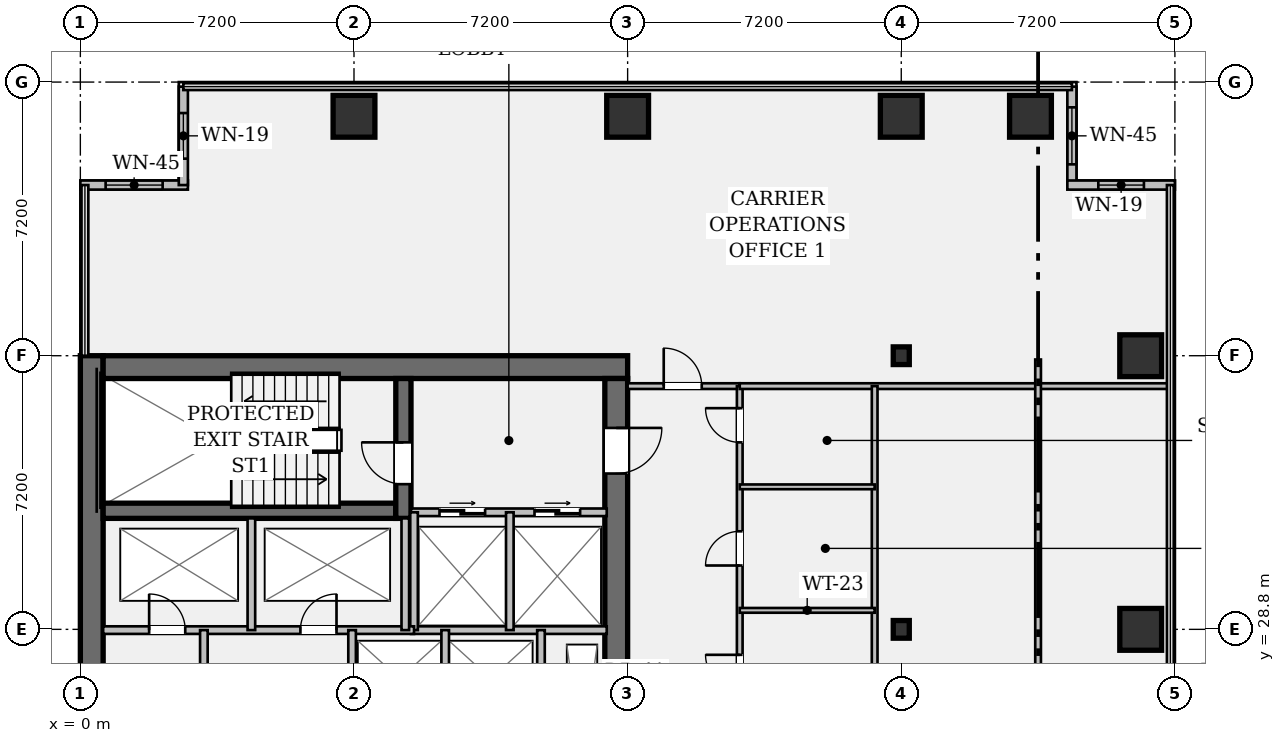
"""IFC4 building model, lengths in metres.
Left out: names, types, materials, properties, quantities, classifications, styles, units other than length and angle.
Written with IfcOpenShell. Run it as: python <this file> out.ifc"""

import sys

from ifc_helpers import new_model, si_unit, direction, frame, frame_2d, origin, origin_2d, place, context, subcontext, project, spatial, rectangle, hollow_rectangle, i_section, extrude, element, fill, save


model = new_model("IFC4")
c1 = context("Model", 3, precision=1e-05, world=origin(), true_north=direction((0.0, 1.0)))
c2 = subcontext(c1, "Body", "Model", "MODEL_VIEW")
j1 = project(units=[si_unit("LENGTHUNIT", "METRE"), si_unit("PLANEANGLEUNIT", "RADIAN")], contexts=[c1])
p1 = place(None, origin())
s1 = spatial("IfcSite", under=j1, at=p1, CompositionType="ELEMENT")
p2 = place(p1, origin())
s2 = spatial("IfcBuilding", under=s1, at=p2, CompositionType="ELEMENT")
p3 = place(p2, frame((0.0, 0.0, 35.0)))
s3 = spatial("IfcBuildingStorey", under=s2, at=p3, CompositionType="ELEMENT", Elevation=35.0)
p4 = place(p3, frame((0.3, 7.2, 0.0), z_axis=(0.0, 0.0, 1.0), x_axis=(0.0, 1.0, 0.0)))
e1 = element("IfcWall", 1, at=p4, inside=s3, PredefinedType="SHEAR", context=c2, shape_type="SweptSolid", body=[
    extrude(rectangle(XDim=28.8, YDim=0.6, at=frame_2d((14.4, 0.0))), origin(), (0.0, 0.0, 1.0), 3.57),
])
p5 = place(p3, frame((0.6, 35.7, 0.0), z_axis=(0.0, 0.0, 1.0), x_axis=(1.0, 0.0, 0.0)))
e2 = element("IfcWall", 2, at=p5, inside=s3, PredefinedType="SHEAR", context=c2, shape_type="SweptSolid", body=[
    extrude(rectangle(XDim=13.8, YDim=0.6, at=frame_2d((6.9, 0.0))), origin(), (0.0, 0.0, 1.0), 3.57),
])
p6 = place(p3, frame((14.1, 35.4, 0.0), z_axis=(0.0, 0.0, 1.0), x_axis=(0.0, -1.0, 0.0)))
e3 = element("IfcWall", 3, at=p6, inside=s3, PredefinedType="SHEAR", context=c2, shape_type="SweptSolid", body=[
    extrude(rectangle(XDim=27.6, YDim=0.6, at=frame_2d((13.8, 0.0))), origin(), (0.0, 0.0, 1.0), 3.57),
])
p7 = place(p6, frame((1.3, 0.0, 0.0)))
e4 = element("IfcOpeningElement", 4, at=p7, cuts=e3, PredefinedType="OPENING", context=c2, shape_type="SweptSolid", body=[
    extrude(rectangle(XDim=1.2, YDim=2.15, at=frame_2d((0.6, 1.075))), frame((0.0, 0.312, 0.0), z_axis=(0.0, -1.0, 0.0), x_axis=(1.0, 0.0, 0.0)), (0.0, 0.0, 1.0), 0.624),
])
p8 = place(p6, frame((25.25, 0.0, 0.0)))
e5 = element("IfcOpeningElement", 5, at=p8, cuts=e3, PredefinedType="OPENING", context=c2, shape_type="SweptSolid", body=[
    extrude(rectangle(XDim=1.2, YDim=2.15, at=frame_2d((0.6, 1.075))), frame((0.0, 0.312, 0.0), z_axis=(0.0, -1.0, 0.0), x_axis=(1.0, 0.0, 0.0)), (0.0, 0.0, 1.0), 0.624),
])
p9 = place(p6, frame((14.6, 0.0, 0.0)))
e6 = element("IfcOpeningElement", 6, at=p9, cuts=e3, PredefinedType="OPENING", context=c2, shape_type="SweptSolid", body=[
    extrude(rectangle(XDim=1.6, YDim=2.2, at=frame_2d((0.8, 1.1))), frame((0.0, 0.312, 0.0), z_axis=(0.0, -1.0, 0.0), x_axis=(1.0, 0.0, 0.0)), (0.0, 0.0, 1.0), 0.624),
])
p10 = place(p3, frame((0.6, 31.92, 0.0), z_axis=(0.0, 0.0, 1.0), x_axis=(1.0, 0.0, 0.0)))
e7 = element("IfcWall", 7, at=p10, inside=s3, PredefinedType="SHEAR", context=c2, shape_type="SweptSolid", body=[
    extrude(rectangle(XDim=7.7, YDim=0.4, at=frame_2d((3.85, 0.0))), origin(), (0.0, 0.0, 1.0), 3.57),
])
p11 = place(p3, frame((8.5, 31.72, 0.0), z_axis=(0.0, 0.0, 1.0), x_axis=(0.0, 1.0, 0.0)))
e8 = element("IfcWall", 8, at=p11, inside=s3, PredefinedType="SHEAR", context=c2, shape_type="SweptSolid", body=[
    extrude(rectangle(XDim=3.68, YDim=0.4, at=frame_2d((1.84, 0.0))), origin(), (0.0, 0.0, 1.0), 3.57),
])
p12 = place(p11, frame((0.9, 0.0, 0.0)))
e9 = element("IfcOpeningElement", 9, at=p12, cuts=e8, PredefinedType="OPENING", context=c2, shape_type="SweptSolid", body=[
    extrude(rectangle(XDim=1.1, YDim=2.15, at=frame_2d((0.55, 1.075))), frame((0.0, 0.212, 0.0), z_axis=(0.0, -1.0, 0.0), x_axis=(1.0, 0.0, 0.0)), (0.0, 0.0, 1.0), 0.424),
])
for number, where, z_axis, x_axis in (
    (10, (7.2, 42.3, 0.0), (0.0, 0.0, 1.0), (1.0, 0.0, 0.0)),
    (11, (14.4, 42.3, 0.0), (0.0, 0.0, 1.0), (1.0, 0.0, 0.0)),
):
    element("IfcColumn", number, at=place(p3, frame(where, z_axis=z_axis, x_axis=x_axis)), inside=s3, PredefinedType="COLUMN", context=c2, shape_type="SweptSolid", body=[
        extrude(hollow_rectangle(XDim=1.1, YDim=1.1, WallThickness=0.07, at=origin_2d()), origin(), (0.0, 0.0, 1.0), 3.57),
    ])
for number, where, z_axis, x_axis in (
    (12, (21.6, 28.8, 0.0), (0.0, 0.0, 1.0), (1.0, 0.0, 0.0)),
    (13, (21.6, 36.0, 0.0), (0.0, 0.0, 1.0), (1.0, 0.0, 0.0)),
):
    element("IfcColumn", number, at=place(p3, frame(where, z_axis=z_axis, x_axis=x_axis)), inside=s3, PredefinedType="COLUMN", context=c2, shape_type="SweptSolid", body=[
        extrude(i_section(OverallWidth=0.422, OverallDepth=0.465, WebThickness=0.045, FlangeThickness=0.073, FilletRadius=0.018, at=origin_2d()), origin(), (0.0, 0.0, 1.0), 3.57),
    ])
for number, where, z_axis, x_axis in (
    (14, (21.6, 42.3, 0.0), (0.0, 0.0, 1.0), (1.0, 0.0, 0.0)),
    (15, (25.0, 42.3, 0.0), (0.0, 0.0, 1.0), (1.0, 0.0, 0.0)),
    (16, (27.9, 28.8, 0.0), (0.0, 0.0, 1.0), (1.0, 0.0, 0.0)),
    (17, (27.9, 36.0, 0.0), (0.0, 0.0, 1.0), (1.0, 0.0, 0.0)),
):
    element("IfcColumn", number, at=place(p3, frame(where, z_axis=z_axis, x_axis=x_axis)), inside=s3, PredefinedType="COLUMN", context=c2, shape_type="SweptSolid", body=[
        extrude(hollow_rectangle(XDim=1.1, YDim=1.1, WallThickness=0.07, at=origin_2d()), origin(), (0.0, 0.0, 1.0), 3.57),
    ])
p13 = place(p3, frame((0.0, 40.49, 0.0), z_axis=(0.0, 0.0, 1.0), x_axis=(1.0, 0.0, 0.0)))
e18 = element("IfcWall", 18, at=p13, inside=s3, PredefinedType="STANDARD", context=c2, shape_type="SweptSolid", body=[
    extrude(rectangle(XDim=2.83, YDim=0.24, at=frame_2d((1.415, 0.0))), origin(), (0.0, 0.0, 1.0), 3.57),
])
p14 = place(p13, frame((0.665, 0.0, 0.95)))
e19 = element("IfcOpeningElement", 19, at=p14, cuts=e18, PredefinedType="OPENING", context=c2, shape_type="SweptSolid", body=[
    extrude(rectangle(XDim=1.5, YDim=1.8, at=frame_2d((0.75, 0.9))), frame((0.0, 0.132, 0.0), z_axis=(0.0, -1.0, 0.0), x_axis=(1.0, 0.0, 0.0)), (0.0, 0.0, 1.0), 0.264),
])
p15 = place(p3, frame((2.71, 40.49, 0.0), z_axis=(0.0, 0.0, 1.0), x_axis=(0.0, 1.0, 0.0)))
e20 = element("IfcWall", 20, at=p15, inside=s3, PredefinedType="STANDARD", context=c2, shape_type="SweptSolid", body=[
    extrude(rectangle(XDim=2.59, YDim=0.24, at=frame_2d((1.295, 0.0))), origin(), (0.0, 0.0, 1.0), 3.57),
])
p16 = place(p15, frame((0.695, 0.0, 0.95)))
e21 = element("IfcOpeningElement", 21, at=p16, cuts=e20, PredefinedType="OPENING", context=c2, shape_type="SweptSolid", body=[
    extrude(rectangle(XDim=1.2, YDim=1.8, at=frame_2d((0.6, 0.9))), frame((0.0, 0.132, 0.0), z_axis=(0.0, -1.0, 0.0), x_axis=(1.0, 0.0, 0.0)), (0.0, 0.0, 1.0), 0.264),
])
p17 = place(p3, frame((26.09, 43.08, 0.0), z_axis=(0.0, 0.0, 1.0), x_axis=(0.0, -1.0, 0.0)))
e22 = element("IfcWall", 22, at=p17, inside=s3, PredefinedType="STANDARD", context=c2, shape_type="SweptSolid", body=[
    extrude(rectangle(XDim=2.59, YDim=0.24, at=frame_2d((1.295, 0.0))), origin(), (0.0, 0.0, 1.0), 3.57),
])
p18 = place(p17, frame((0.545, 0.0, 0.95)))
e23 = element("IfcOpeningElement", 23, at=p18, cuts=e22, PredefinedType="OPENING", context=c2, shape_type="SweptSolid", body=[
    extrude(rectangle(XDim=1.5, YDim=1.8, at=frame_2d((0.75, 0.9))), frame((0.0, 0.132, 0.0), z_axis=(0.0, -1.0, 0.0), x_axis=(1.0, 0.0, 0.0)), (0.0, 0.0, 1.0), 0.264),
])
p19 = place(p3, frame((25.97, 40.49, 0.0), z_axis=(0.0, 0.0, 1.0), x_axis=(1.0, 0.0, 0.0)))
e24 = element("IfcWall", 24, at=p19, inside=s3, PredefinedType="STANDARD", context=c2, shape_type="SweptSolid", body=[
    extrude(rectangle(XDim=2.83, YDim=0.24, at=frame_2d((1.415, 0.0))), origin(), (0.0, 0.0, 1.0), 3.57),
])
p20 = place(p19, frame((0.815, 0.0, 0.95)))
e25 = element("IfcOpeningElement", 25, at=p20, cuts=e24, PredefinedType="OPENING", context=c2, shape_type="SweptSolid", body=[
    extrude(rectangle(XDim=1.2, YDim=1.8, at=frame_2d((0.6, 0.9))), frame((0.0, 0.132, 0.0), z_axis=(0.0, -1.0, 0.0), x_axis=(1.0, 0.0, 0.0)), (0.0, 0.0, 1.0), 0.264),
])
p21 = place(p3, frame((8.7, 31.88, 0.0), z_axis=(0.0, 0.0, 1.0), x_axis=(1.0, 0.0, 0.0)))
e26 = element("IfcWall", 26, at=p21, inside=s3, PredefinedType="PARTITIONING", context=c2, shape_type="SweptSolid", body=[
    extrude(rectangle(XDim=5.15, YDim=0.2, at=frame_2d((2.575, 0.0))), origin(), (0.0, 0.0, 1.0), 3.57),
])
p22 = place(p21, frame((0.75, 0.0, 0.0)))
e27 = element("IfcOpeningElement", 27, at=p22, cuts=e26, PredefinedType="OPENING", context=c2, shape_type="SweptSolid", body=[
    extrude(rectangle(XDim=1.2, YDim=2.2, at=frame_2d((0.6, 1.1))), frame((0.0, 0.112, 0.0), z_axis=(0.0, -1.0, 0.0), x_axis=(1.0, 0.0, 0.0)), (0.0, 0.0, 1.0), 0.224),
])
p23 = place(p21, frame((3.25, 0.0, 0.0)))
e28 = element("IfcOpeningElement", 28, at=p23, cuts=e26, PredefinedType="OPENING", context=c2, shape_type="SweptSolid", body=[
    extrude(rectangle(XDim=1.2, YDim=2.2, at=frame_2d((0.6, 1.1))), frame((0.0, 0.112, 0.0), z_axis=(0.0, -1.0, 0.0), x_axis=(1.0, 0.0, 0.0)), (0.0, 0.0, 1.0), 0.224),
])
p24 = place(p3, frame((8.7, 28.78, 0.0), z_axis=(0.0, 0.0, 1.0), x_axis=(1.0, 0.0, 0.0)))
e29 = element("IfcWall", 29, at=p24, inside=s3, PredefinedType="PARTITIONING", context=c2, shape_type="SweptSolid", body=[
    extrude(rectangle(XDim=5.15, YDim=0.2, at=frame_2d((2.575, 0.0))), origin(), (0.0, 0.0, 1.0), 3.57),
])
for number, where, z_axis, x_axis in (
    (30, (8.78, 28.78, 0.0), (0.0, 0.0, 1.0), (0.0, 1.0, 0.0)),
    (31, (11.3, 28.78, 0.0), (0.0, 0.0, 1.0), (0.0, 1.0, 0.0)),
):
    element("IfcWall", number, at=place(p3, frame(where, z_axis=z_axis, x_axis=x_axis)), inside=s3, PredefinedType="PARTITIONING", context=c2, shape_type="SweptSolid", body=[
        extrude(rectangle(XDim=3.1, YDim=0.2, at=frame_2d((1.55, 0.0))), origin(), (0.0, 0.0, 1.0), 3.57),
    ])
p25 = place(p3, frame((0.6, 28.78, 0.0), z_axis=(0.0, 0.0, 1.0), x_axis=(1.0, 0.0, 0.0)))
e32 = element("IfcWall", 32, at=p25, inside=s3, PredefinedType="PARTITIONING", context=c2, shape_type="SweptSolid", body=[
    extrude(rectangle(XDim=8.18, YDim=0.2, at=frame_2d((4.09, 0.0))), origin(), (0.0, 0.0, 1.0), 3.57),
])
p26 = place(p25, frame((1.21, 0.0, 0.0)))
e33 = element("IfcOpeningElement", 33, at=p26, cuts=e32, PredefinedType="OPENING", context=c2, shape_type="SweptSolid", body=[
    extrude(rectangle(XDim=0.95, YDim=2.15, at=frame_2d((0.475, 1.075))), frame((0.0, 0.112, 0.0), z_axis=(0.0, -1.0, 0.0), x_axis=(1.0, 0.0, 0.0)), (0.0, 0.0, 1.0), 0.224),
])
p27 = place(p25, frame((5.19, 0.0, 0.0)))
e34 = element("IfcOpeningElement", 34, at=p27, cuts=e32, PredefinedType="OPENING", context=c2, shape_type="SweptSolid", body=[
    extrude(rectangle(XDim=0.95, YDim=2.15, at=frame_2d((0.475, 1.075))), frame((0.0, 0.112, 0.0), z_axis=(0.0, -1.0, 0.0), x_axis=(1.0, 0.0, 0.0)), (0.0, 0.0, 1.0), 0.224),
])
for number, where, z_axis, x_axis in (
    (35, (4.5, 28.78, 0.0), (0.0, 0.0, 1.0), (0.0, 1.0, 0.0)),
    (36, (8.55, 28.78, 0.0), (0.0, 0.0, 1.0), (0.0, 1.0, 0.0)),
):
    element("IfcWall", number, at=place(p3, frame(where, z_axis=z_axis, x_axis=x_axis)), inside=s3, PredefinedType="PARTITIONING", context=c2, shape_type="SweptSolid", body=[
        extrude(rectangle(XDim=2.94, YDim=0.2, at=frame_2d((1.47, 0.0))), origin(), (0.0, 0.0, 1.0), 3.57),
    ])
p28 = place(p3, frame((3.25, 15.7, 0.0), z_axis=(0.0, 0.0, 1.0), x_axis=(0.0, 1.0, 0.0)))
e37 = element("IfcWall", 37, at=p28, inside=s3, PredefinedType="PARTITIONING", context=c2, shape_type="SweptSolid", body=[
    extrude(rectangle(XDim=13.08, YDim=0.2, at=frame_2d((6.54, 0.0))), origin(), (0.0, 0.0, 1.0), 3.57),
])
for number, where, z_axis, x_axis in (
    (38, (7.15, 26.4, 0.0), (0.0, 0.0, 1.0), (0.0, 1.0, 0.0)),
    (39, (9.6, 26.4, 0.0), (0.0, 0.0, 1.0), (0.0, 1.0, 0.0)),
):
    element("IfcWall", number, at=place(p3, frame(where, z_axis=z_axis, x_axis=x_axis)), inside=s3, PredefinedType="PARTITIONING", context=c2, shape_type="SweptSolid", body=[
        extrude(rectangle(XDim=2.38, YDim=0.2, at=frame_2d((1.19, 0.0))), origin(), (0.0, 0.0, 1.0), 3.57),
    ])
p29 = place(p3, frame((12.12, 22.2, 0.0), z_axis=(0.0, 0.0, 1.0), x_axis=(0.0, 1.0, 0.0)))
e40 = element("IfcWall", 40, at=p29, inside=s3, PredefinedType="PARTITIONING", context=c2, shape_type="SweptSolid", body=[
    extrude(rectangle(XDim=6.58, YDim=0.2, at=frame_2d((3.29, 0.0))), origin(), (0.0, 0.0, 1.0), 3.57),
])
p30 = place(p29, frame((2.75, 0.0, 0.0)))
e41 = element("IfcOpeningElement", 41, at=p30, cuts=e40, PredefinedType="OPENING", context=c2, shape_type="SweptSolid", body=[
    extrude(rectangle(XDim=0.85, YDim=2.15, at=frame_2d((0.425, 1.075))), frame((0.0, 0.112, 0.0), z_axis=(0.0, -1.0, 0.0), x_axis=(1.0, 0.0, 0.0)), (0.0, 0.0, 1.0), 0.224),
])
p31 = place(p3, frame((14.4, 35.2, 0.0), z_axis=(0.0, 0.0, 1.0), x_axis=(1.0, 0.0, 0.0)))
e42 = element("IfcWall", 42, at=p31, inside=s3, PredefinedType="PARTITIONING", context=c2, shape_type="SweptSolid", body=[
    extrude(rectangle(XDim=2.95, YDim=0.15, at=frame_2d((1.475, 0.0))), origin(), (0.0, 0.0, 1.0), 2.628),
])
p32 = place(p31, frame((0.95, 0.0, 0.0)))
e43 = element("IfcOpeningElement", 43, at=p32, cuts=e42, PredefinedType="OPENING", context=c2, shape_type="SweptSolid", body=[
    extrude(rectangle(XDim=1.0, YDim=2.15, at=frame_2d((0.5, 1.075))), frame((0.0, 0.087, 0.0), z_axis=(0.0, -1.0, 0.0), x_axis=(1.0, 0.0, 0.0)), (0.0, 0.0, 1.0), 0.174),
])
p33 = place(p3, frame((17.35, 13.0, 0.0), z_axis=(0.0, 0.0, 1.0), x_axis=(0.0, 1.0, 0.0)))
e44 = element("IfcWall", 44, at=p33, inside=s3, PredefinedType="PARTITIONING", context=c2, shape_type="SweptSolid", body=[
    extrude(rectangle(XDim=22.2, YDim=0.15, at=frame_2d((11.1, 0.0))), origin(), (0.0, 0.0, 1.0), 2.628),
])
p34 = place(p33, frame((10.98, 0.0, 0.0)))
e45 = element("IfcOpeningElement", 45, at=p34, cuts=e44, PredefinedType="OPENING", context=c2, shape_type="SweptSolid", body=[
    extrude(rectangle(XDim=0.9, YDim=2.15, at=frame_2d((0.45, 1.075))), frame((0.0, 0.087, 0.0), z_axis=(0.0, -1.0, 0.0), x_axis=(1.0, 0.0, 0.0)), (0.0, 0.0, 1.0), 0.174),
])
p35 = place(p33, frame((14.23, 0.0, 0.0)))
e46 = element("IfcOpeningElement", 46, at=p35, cuts=e44, PredefinedType="OPENING", context=c2, shape_type="SweptSolid", body=[
    extrude(rectangle(XDim=0.9, YDim=2.15, at=frame_2d((0.45, 1.075))), frame((0.0, 0.087, 0.0), z_axis=(0.0, -1.0, 0.0), x_axis=(1.0, 0.0, 0.0)), (0.0, 0.0, 1.0), 0.174),
])
p36 = place(p33, frame((17.48, 0.0, 0.0)))
e47 = element("IfcOpeningElement", 47, at=p36, cuts=e44, PredefinedType="OPENING", context=c2, shape_type="SweptSolid", body=[
    extrude(rectangle(XDim=0.9, YDim=2.15, at=frame_2d((0.45, 1.075))), frame((0.0, 0.087, 0.0), z_axis=(0.0, -1.0, 0.0), x_axis=(1.0, 0.0, 0.0)), (0.0, 0.0, 1.0), 0.174),
])
p37 = place(p33, frame((20.72, 0.0, 0.0)))
e48 = element("IfcOpeningElement", 48, at=p37, cuts=e44, PredefinedType="OPENING", context=c2, shape_type="SweptSolid", body=[
    extrude(rectangle(XDim=0.9, YDim=2.15, at=frame_2d((0.45, 1.075))), frame((0.0, 0.087, 0.0), z_axis=(0.0, -1.0, 0.0), x_axis=(1.0, 0.0, 0.0)), (0.0, 0.0, 1.0), 0.174),
])
p38 = place(p3, frame((17.35, 35.2, 0.0), z_axis=(0.0, 0.0, 1.0), x_axis=(1.0, 0.0, 0.0)))
e49 = element("IfcWall", 49, at=p38, inside=s3, PredefinedType="PARTITIONING", context=c2, shape_type="SweptSolid", body=[
    extrude(rectangle(XDim=11.33, YDim=0.15, at=frame_2d((5.665, 0.0))), origin(), (0.0, 0.0, 1.0), 2.628),
])
p39 = place(p3, frame((20.9, 22.7, 0.0), z_axis=(0.0, 0.0, 1.0), x_axis=(0.0, 1.0, 0.0)))
e50 = element("IfcWall", 50, at=p39, inside=s3, PredefinedType="PARTITIONING", context=c2, shape_type="SweptSolid", body=[
    extrude(rectangle(XDim=12.5, YDim=0.15, at=frame_2d((6.25, 0.0))), origin(), (0.0, 0.0, 1.0), 2.628),
])
for number, where, z_axis, x_axis in (
    (51, (17.35, 29.3, 0.0), (0.0, 0.0, 1.0), (1.0, 0.0, 0.0)),
    (52, (17.35, 32.55, 0.0), (0.0, 0.0, 1.0), (1.0, 0.0, 0.0)),
):
    element("IfcWall", number, at=place(p3, frame(where, z_axis=z_axis, x_axis=x_axis)), inside=s3, PredefinedType="PARTITIONING", context=c2, shape_type="SweptSolid", body=[
        extrude(rectangle(XDim=3.55, YDim=0.125, at=frame_2d((1.775, 0.0))), origin(), (0.0, 0.0, 1.0), 3.088),
    ])
p40 = place(p3, frame((25.2, 13.0, 0.0), z_axis=(0.0, 0.0, 1.0), x_axis=(0.0, 1.0, 0.0)))
e53 = element("IfcWall", 53, at=p40, inside=s3, PredefinedType="PARTITIONING", context=c2, shape_type="SweptSolid", body=[
    extrude(rectangle(XDim=22.9, YDim=0.15, at=frame_2d((11.45, 0.0))), origin(), (0.0, 0.0, 1.0), 2.628),
])
p41 = place(p14, origin())
e54 = element("IfcWindow", 54, at=p41, inside=s3, PartitioningType="SINGLE_PANEL", PredefinedType="WINDOW", context=c2, shape_type="SweptSolid", body=[
    extrude(rectangle(XDim=1.5, YDim=1.8, at=frame_2d((0.75, 0.9))), frame((0.0, 0.03, 0.0), z_axis=(0.0, -1.0, 0.0), x_axis=(1.0, 0.0, 0.0)), (0.0, 0.0, 1.0), 0.06),
])
fill(e19, e54)
p42 = place(p16, origin())
e55 = element("IfcWindow", 55, at=p42, inside=s3, PartitioningType="SINGLE_PANEL", PredefinedType="WINDOW", context=c2, shape_type="SweptSolid", body=[
    extrude(rectangle(XDim=1.2, YDim=1.8, at=frame_2d((0.6, 0.9))), frame((0.0, 0.03, 0.0), z_axis=(0.0, -1.0, 0.0), x_axis=(1.0, 0.0, 0.0)), (0.0, 0.0, 1.0), 0.06),
])
fill(e21, e55)
p43 = place(p18, origin())
e56 = element("IfcWindow", 56, at=p43, inside=s3, PartitioningType="SINGLE_PANEL", PredefinedType="WINDOW", context=c2, shape_type="SweptSolid", body=[
    extrude(rectangle(XDim=1.5, YDim=1.8, at=frame_2d((0.75, 0.9))), frame((0.0, 0.03, 0.0), z_axis=(0.0, -1.0, 0.0), x_axis=(1.0, 0.0, 0.0)), (0.0, 0.0, 1.0), 0.06),
])
fill(e23, e56)
p44 = place(p20, origin())
e57 = element("IfcWindow", 57, at=p44, inside=s3, PartitioningType="SINGLE_PANEL", PredefinedType="WINDOW", context=c2, shape_type="SweptSolid", body=[
    extrude(rectangle(XDim=1.2, YDim=1.8, at=frame_2d((0.6, 0.9))), frame((0.0, 0.03, 0.0), z_axis=(0.0, -1.0, 0.0), x_axis=(1.0, 0.0, 0.0)), (0.0, 0.0, 1.0), 0.06),
])
fill(e25, e57)
p45 = place(p12, origin())
e58 = element("IfcDoor", 58, at=p45, inside=s3, OperationType="SINGLE_SWING_RIGHT", PredefinedType="DOOR", context=c2, shape_type="SweptSolid", body=[
    extrude(rectangle(XDim=1.1, YDim=2.15, at=frame_2d((0.55, 1.075))), frame((0.0, 0.025, 0.0), z_axis=(0.0, -1.0, 0.0), x_axis=(1.0, 0.0, 0.0)), (0.0, 0.0, 1.0), 0.05),
])
fill(e9, e58)
p46 = place(p7, origin())
e59 = element("IfcDoor", 59, at=p46, inside=s3, OperationType="SINGLE_SWING_LEFT", PredefinedType="DOOR", context=c2, shape_type="SweptSolid", body=[
    extrude(rectangle(XDim=1.2, YDim=2.15, at=frame_2d((0.6, 1.075))), frame((0.0, 0.025, 0.0), z_axis=(0.0, -1.0, 0.0), x_axis=(1.0, 0.0, 0.0)), (0.0, 0.0, 1.0), 0.05),
])
fill(e4, e59)
p47 = place(p22, origin())
e60 = element("IfcDoor", 60, at=p47, inside=s3, OperationType="DOUBLE_DOOR_SLIDING", PredefinedType="DOOR", context=c2, shape_type="SweptSolid", body=[
    extrude(rectangle(XDim=1.2, YDim=2.2, at=frame_2d((0.6, 1.1))), frame((0.0, 0.025, 0.0), z_axis=(0.0, -1.0, 0.0), x_axis=(1.0, 0.0, 0.0)), (0.0, 0.0, 1.0), 0.05),
])
fill(e27, e60)
p48 = place(p23, origin())
e61 = element("IfcDoor", 61, at=p48, inside=s3, OperationType="DOUBLE_DOOR_SLIDING", PredefinedType="DOOR", context=c2, shape_type="SweptSolid", body=[
    extrude(rectangle(XDim=1.2, YDim=2.2, at=frame_2d((0.6, 1.1))), frame((0.0, 0.025, 0.0), z_axis=(0.0, -1.0, 0.0), x_axis=(1.0, 0.0, 0.0)), (0.0, 0.0, 1.0), 0.05),
])
fill(e28, e61)
p49 = place(p26, origin())
e62 = element("IfcDoor", 62, at=p49, inside=s3, OperationType="SINGLE_SWING_LEFT", PredefinedType="DOOR", context=c2, shape_type="SweptSolid", body=[
    extrude(rectangle(XDim=0.95, YDim=2.15, at=frame_2d((0.475, 1.075))), frame((0.0, 0.025, 0.0), z_axis=(0.0, -1.0, 0.0), x_axis=(1.0, 0.0, 0.0)), (0.0, 0.0, 1.0), 0.05),
])
fill(e33, e62)
p50 = place(p27, origin())
e63 = element("IfcDoor", 63, at=p50, inside=s3, OperationType="SINGLE_SWING_RIGHT", PredefinedType="DOOR", context=c2, shape_type="SweptSolid", body=[
    extrude(rectangle(XDim=0.95, YDim=2.15, at=frame_2d((0.475, 1.075))), frame((0.0, 0.025, 0.0), z_axis=(0.0, -1.0, 0.0), x_axis=(1.0, 0.0, 0.0)), (0.0, 0.0, 1.0), 0.05),
])
fill(e34, e63)
p51 = place(p32, origin())
e64 = element("IfcDoor", 64, at=p51, inside=s3, OperationType="SINGLE_SWING_LEFT", PredefinedType="DOOR", context=c2, shape_type="SweptSolid", body=[
    extrude(rectangle(XDim=1.0, YDim=2.15, at=frame_2d((0.5, 1.075))), frame((0.0, 0.025, 0.0), z_axis=(0.0, -1.0, 0.0), x_axis=(1.0, 0.0, 0.0)), (0.0, 0.0, 1.0), 0.05),
])
fill(e43, e64)
p52 = place(p35, origin())
e65 = element("IfcDoor", 65, at=p52, inside=s3, OperationType="SINGLE_SWING_RIGHT", PredefinedType="DOOR", context=c2, shape_type="SweptSolid", body=[
    extrude(rectangle(XDim=0.9, YDim=2.15, at=frame_2d((0.45, 1.075))), frame((0.0, 0.025, 0.0), z_axis=(0.0, -1.0, 0.0), x_axis=(1.0, 0.0, 0.0)), (0.0, 0.0, 1.0), 0.05),
])
fill(e46, e65)
p53 = place(p36, origin())
e66 = element("IfcDoor", 66, at=p53, inside=s3, OperationType="SINGLE_SWING_LEFT", PredefinedType="DOOR", context=c2, shape_type="SweptSolid", body=[
    extrude(rectangle(XDim=0.9, YDim=2.15, at=frame_2d((0.45, 1.075))), frame((0.0, 0.025, 0.0), z_axis=(0.0, -1.0, 0.0), x_axis=(1.0, 0.0, 0.0)), (0.0, 0.0, 1.0), 0.05),
])
fill(e47, e66)
p54 = place(p37, origin())
e67 = element("IfcDoor", 67, at=p54, inside=s3, OperationType="SINGLE_SWING_RIGHT", PredefinedType="DOOR", context=c2, shape_type="SweptSolid", body=[
    extrude(rectangle(XDim=0.9, YDim=2.15, at=frame_2d((0.45, 1.075))), frame((0.0, 0.025, 0.0), z_axis=(0.0, -1.0, 0.0), x_axis=(1.0, 0.0, 0.0)), (0.0, 0.0, 1.0), 0.05),
])
fill(e48, e67)
save(model, sys.argv[1])
